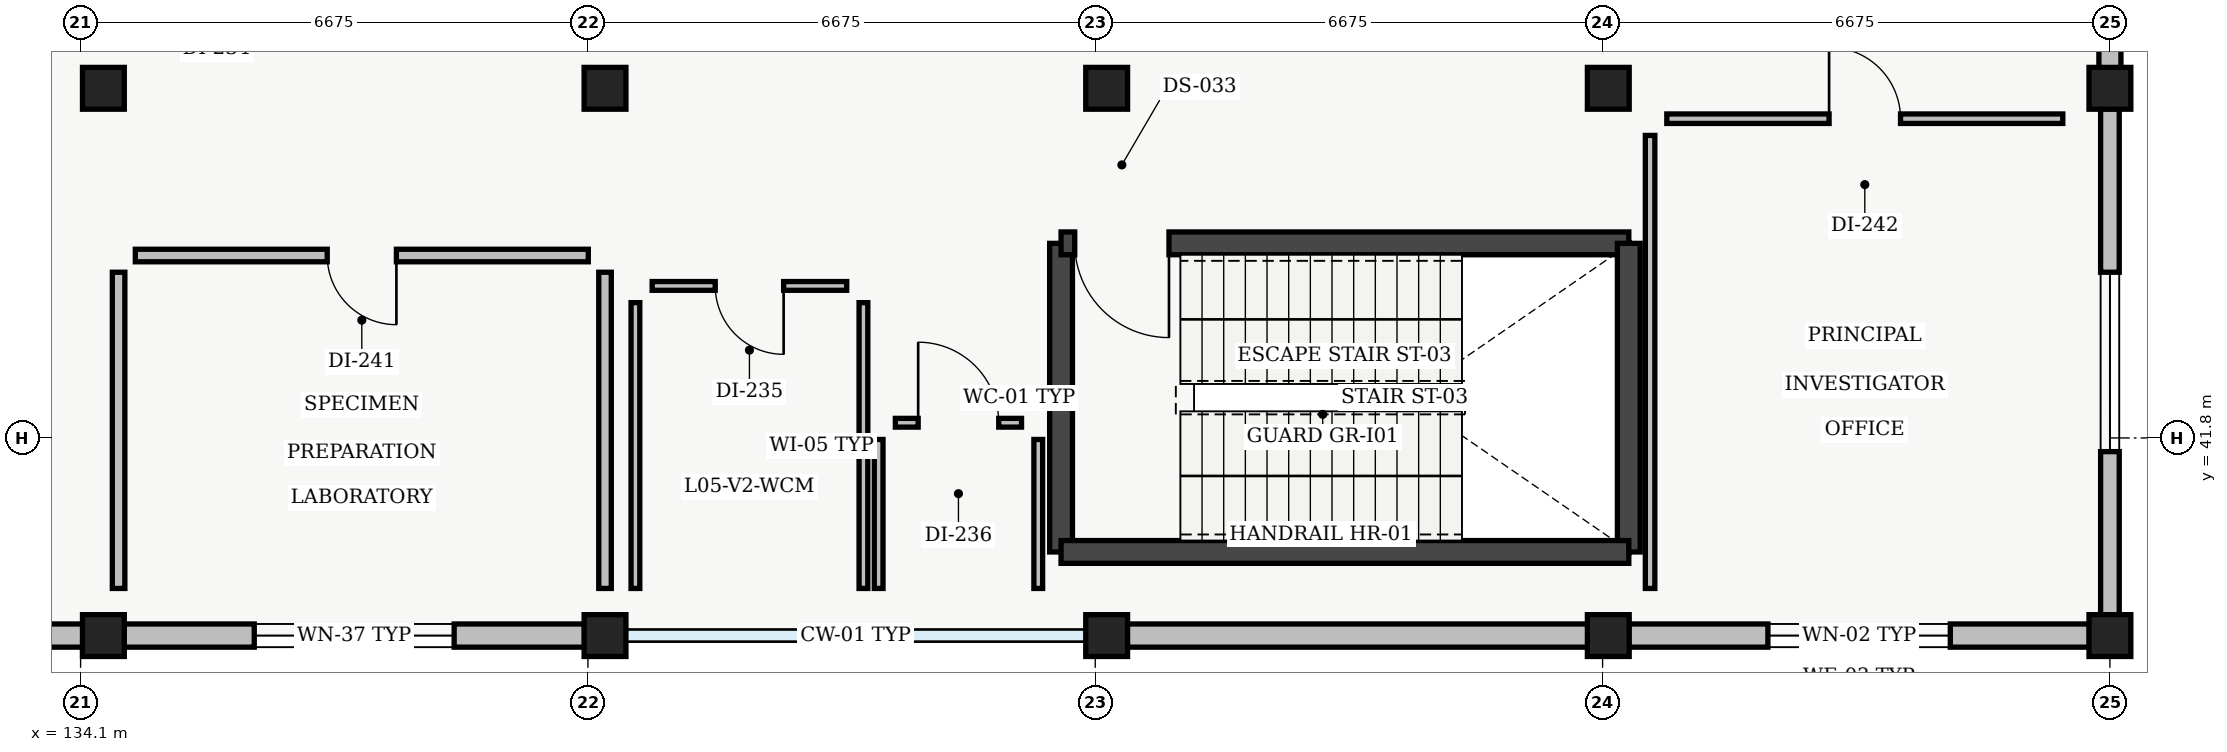
"""IFC4 building model, lengths in metres.
Left out: names, types, materials, properties, quantities, classifications, styles, units other than length and angle.
Written with IfcOpenShell. Run it as: python <this file> out.ifc"""

import sys

from ifc_helpers import new_model, si_unit, direction, frame, frame_2d, origin, origin_2d, place, context, subcontext, project, spatial, rectangle, extrude, element, fill, save


model = new_model("IFC4")
c1 = context("Model", 3, precision=1e-05, world=origin(), true_north=direction((0.0, 1.0)))
c2 = subcontext(c1, "Body", "Model", "MODEL_VIEW")
j1 = project(units=[si_unit("LENGTHUNIT", "METRE"), si_unit("PLANEANGLEUNIT", "RADIAN")], contexts=[c1])
p1 = place(None, origin())
s1 = spatial("IfcSite", under=j1, at=p1, CompositionType="ELEMENT")
p2 = place(p1, origin())
s2 = spatial("IfcBuilding", under=s1, at=p2, CompositionType="ELEMENT")
p3 = place(p2, frame((0.0, 0.0, 23.1)))
s3 = spatial("IfcBuildingStorey", under=s2, at=p3, CompositionType="ELEMENT", Elevation=23.1)
for number, where, z_axis, x_axis in (
    (1, (134.4, 39.2, 0.0), (0.0, 0.0, 1.0), (1.0, 0.0, 0.0)),
    (2, (134.4, 46.4, 0.0), (0.0, 0.0, 1.0), (1.0, 0.0, 0.0)),
    (3, (141.0, 39.2, 0.0), (0.0, 0.0, 1.0), (1.0, 0.0, 0.0)),
    (4, (141.0, 46.4, 0.0), (0.0, 0.0, 1.0), (1.0, 0.0, 0.0)),
    (5, (147.6, 39.2, 0.0), (0.0, 0.0, 1.0), (1.0, 0.0, 0.0)),
    (6, (147.6, 46.4, 0.0), (0.0, 0.0, 1.0), (1.0, 0.0, 0.0)),
    (7, (154.2, 39.2, 0.0), (0.0, 0.0, 1.0), (1.0, 0.0, 0.0)),
    (8, (154.2, 46.4, 0.0), (0.0, 0.0, 1.0), (1.0, 0.0, 0.0)),
    (9, (160.8, 39.2, 0.0), (0.0, 0.0, 1.0), (1.0, 0.0, 0.0)),
    (10, (160.8, 46.4, 0.0), (0.0, 0.0, 1.0), (1.0, 0.0, 0.0)),
):
    element("IfcColumn", number, at=place(p3, frame(where, z_axis=z_axis, x_axis=x_axis)), inside=s3, PredefinedType="COLUMN", context=c2, shape_type="SweptSolid", body=[
        extrude(rectangle(XDim=0.55, YDim=0.55, at=origin_2d()), origin(), (0.0, 0.0, 1.0), 4.29),
    ])
p4 = place(p3, frame((160.8, 53.33, 0.0), z_axis=(0.0, 0.0, 1.0), x_axis=(0.0, -1.0, 0.0)))
e11 = element("IfcWall", 11, at=p4, inside=s3, PredefinedType="STANDARD", context=c2, shape_type="SweptSolid", body=[
    extrude(rectangle(XDim=6.66, YDim=0.29, at=frame_2d((3.33, 0.0))), origin(), (0.0, 0.0, 1.0), 3.775),
])
p5 = place(p4, frame((2.105, 0.0, 0.95)))
e12 = element("IfcOpeningElement", 12, at=p5, cuts=e11, PredefinedType="OPENING", context=c2, shape_type="SweptSolid", body=[
    extrude(rectangle(XDim=2.45, YDim=1.38, at=frame_2d((1.225, 0.69))), frame((0.0, 0.145, 0.0), z_axis=(0.0, -1.0, 0.0), x_axis=(1.0, 0.0, 0.0)), (0.0, 0.0, 1.0), 0.29),
])
p6 = place(p3, frame((160.8, 46.13, 0.0), z_axis=(0.0, 0.0, 1.0), x_axis=(0.0, -1.0, 0.0)))
e13 = element("IfcWall", 13, at=p6, inside=s3, PredefinedType="STANDARD", context=c2, shape_type="SweptSolid", body=[
    extrude(rectangle(XDim=6.66, YDim=0.245, at=frame_2d((3.33, 0.0))), origin(), (0.0, 0.0, 1.0), 3.775),
])
p7 = place(p6, frame((2.15, 0.0, 0.95)))
e14 = element("IfcOpeningElement", 14, at=p7, cuts=e13, PredefinedType="OPENING", context=c2, shape_type="SweptSolid", body=[
    extrude(rectangle(XDim=2.36, YDim=1.36, at=frame_2d((1.18, 0.68))), frame((0.0, 0.123, 0.0), z_axis=(0.0, -1.0, 0.0), x_axis=(1.0, 0.0, 0.0)), (0.0, 0.0, 1.0), 0.245),
])
p8 = place(p3, frame((160.53, 39.2, 0.0), z_axis=(0.0, 0.0, 1.0), x_axis=(-1.0, 0.0, 0.0)))
e15 = element("IfcWall", 15, at=p8, inside=s3, PredefinedType="STANDARD", context=c2, shape_type="SweptSolid", body=[
    extrude(rectangle(XDim=6.06, YDim=0.305, at=frame_2d((3.03, 0.0))), origin(), (0.0, 0.0, 1.0), 3.775),
])
p9 = place(p8, frame((1.83, 0.0, 0.95)))
e16 = element("IfcOpeningElement", 16, at=p9, cuts=e15, PredefinedType="OPENING", context=c2, shape_type="SweptSolid", body=[
    extrude(rectangle(XDim=2.4, YDim=1.65, at=frame_2d((1.2, 0.825))), frame((0.0, 0.152, 0.0), z_axis=(0.0, -1.0, 0.0), x_axis=(1.0, 0.0, 0.0)), (0.0, 0.0, 1.0), 0.305),
])
p10 = place(p3, frame((153.93, 39.2, 0.0), z_axis=(0.0, 0.0, 1.0), x_axis=(-1.0, 0.0, 0.0)))
e17 = element("IfcWall", 17, at=p10, inside=s3, PredefinedType="STANDARD", context=c2, shape_type="SweptSolid", body=[
    extrude(rectangle(XDim=6.06, YDim=0.305, at=frame_2d((3.03, 0.0))), origin(), (0.0, 0.0, 1.0), 3.775),
])
p11 = place(p3, frame((140.73, 39.2, 0.0), z_axis=(0.0, 0.0, 1.0), x_axis=(-1.0, 0.0, 0.0)))
e18 = element("IfcWall", 18, at=p11, inside=s3, PredefinedType="STANDARD", context=c2, shape_type="SweptSolid", body=[
    extrude(rectangle(XDim=6.06, YDim=0.305, at=frame_2d((3.03, 0.0))), origin(), (0.0, 0.0, 1.0), 3.775),
])
p12 = place(p11, frame((1.715, 0.0, 0.95)))
e19 = element("IfcOpeningElement", 19, at=p12, cuts=e18, PredefinedType="OPENING", context=c2, shape_type="SweptSolid", body=[
    extrude(rectangle(XDim=2.63, YDim=1.42, at=frame_2d((1.315, 0.71))), frame((0.0, 0.152, 0.0), z_axis=(0.0, -1.0, 0.0), x_axis=(1.0, 0.0, 0.0)), (0.0, 0.0, 1.0), 0.305),
])
p13 = place(p3, frame((134.13, 39.2, 0.0), z_axis=(0.0, 0.0, 1.0), x_axis=(-1.0, 0.0, 0.0)))
e20 = element("IfcWall", 20, at=p13, inside=s3, PredefinedType="STANDARD", context=c2, shape_type="SweptSolid", body=[
    extrude(rectangle(XDim=6.06, YDim=0.305, at=frame_2d((3.03, 0.0))), origin(), (0.0, 0.0, 1.0), 3.775),
])
p14 = place(p13, frame((1.76, 0.0, 0.95)))
e21 = element("IfcOpeningElement", 21, at=p14, cuts=e20, PredefinedType="OPENING", context=c2, shape_type="SweptSolid", body=[
    extrude(rectangle(XDim=2.54, YDim=1.4, at=frame_2d((1.27, 0.7))), frame((0.0, 0.152, 0.0), z_axis=(0.0, -1.0, 0.0), x_axis=(1.0, 0.0, 0.0)), (0.0, 0.0, 1.0), 0.305),
])
p15 = place(p3, frame((147.0, 40.3, 0.0), z_axis=(0.0, 0.0, 1.0), x_axis=(0.0, 1.0, 0.0)))
e22 = element("IfcWall", 22, at=p15, inside=s3, PredefinedType="SHEAR", context=c2, shape_type="SweptSolid", body=[
    extrude(rectangle(XDim=4.06, YDim=0.3, at=frame_2d((2.03, 0.0))), origin(), (0.0, 0.0, 1.0), 4.28),
])
p16 = place(p3, frame((147.0, 44.36, 0.0), z_axis=(0.0, 0.0, 1.0), x_axis=(1.0, 0.0, 0.0)))
e23 = element("IfcWall", 23, at=p16, inside=s3, PredefinedType="SHEAR", context=c2, shape_type="SweptSolid", body=[
    extrude(rectangle(XDim=7.47, YDim=0.3, at=frame_2d((3.735, 0.0))), origin(), (0.0, 0.0, 1.0), 4.28),
])
p17 = place(p16, frame((0.18, 0.0, 0.0)))
e24 = element("IfcOpeningElement", 24, at=p17, cuts=e23, PredefinedType="OPENING", context=c2, shape_type="SweptSolid", body=[
    extrude(rectangle(XDim=1.24, YDim=2.15, at=frame_2d((0.62, 1.075))), frame((0.0, 0.15, 0.0), z_axis=(0.0, -1.0, 0.0), x_axis=(1.0, 0.0, 0.0)), (0.0, 0.0, 1.0), 0.3),
])
p18 = place(p3, frame((154.47, 44.36, 0.0), z_axis=(0.0, 0.0, 1.0), x_axis=(0.0, -1.0, 0.0)))
e25 = element("IfcWall", 25, at=p18, inside=s3, PredefinedType="SHEAR", context=c2, shape_type="SweptSolid", body=[
    extrude(rectangle(XDim=4.06, YDim=0.3, at=frame_2d((2.03, 0.0))), origin(), (0.0, 0.0, 1.0), 4.28),
])
p19 = place(p3, frame((154.47, 40.3, 0.0), z_axis=(0.0, 0.0, 1.0), x_axis=(-1.0, 0.0, 0.0)))
e26 = element("IfcWall", 26, at=p19, inside=s3, PredefinedType="SHEAR", context=c2, shape_type="SweptSolid", body=[
    extrude(rectangle(XDim=7.47, YDim=0.3, at=frame_2d((3.735, 0.0))), origin(), (0.0, 0.0, 1.0), 4.28),
])
p20 = place(p3, frame((144.4, 39.82, 0.0), z_axis=(0.0, 0.0, 1.0), x_axis=(0.0, 1.0, 0.0)))
e27 = element("IfcWall", 27, at=p20, inside=s3, PredefinedType="PARTITIONING", context=c2, shape_type="SweptSolid", body=[
    extrude(rectangle(XDim=3.76, YDim=0.115, at=frame_2d((1.88, 0.0))), origin(), (0.0, 0.0, 1.0), 3.95),
])
p21 = place(p3, frame((144.18, 43.8, 0.0), z_axis=(0.0, 0.0, 1.0), x_axis=(-1.0, 0.0, 0.0)))
e28 = element("IfcWall", 28, at=p21, inside=s3, PredefinedType="PARTITIONING", context=c2, shape_type="SweptSolid", body=[
    extrude(rectangle(XDim=2.56, YDim=0.115, at=frame_2d((1.28, 0.0))), origin(), (0.0, 0.0, 1.0), 3.95),
])
p22 = place(p21, frame((0.83, 0.0, 0.0)))
e29 = element("IfcOpeningElement", 29, at=p22, cuts=e28, PredefinedType="OPENING", context=c2, shape_type="SweptSolid", body=[
    extrude(rectangle(XDim=0.9, YDim=2.1, at=frame_2d((0.45, 1.05))), frame((0.0, 0.058, 0.0), z_axis=(0.0, -1.0, 0.0), x_axis=(1.0, 0.0, 0.0)), (0.0, 0.0, 1.0), 0.115),
])
p23 = place(p3, frame((141.4, 43.58, 0.0), z_axis=(0.0, 0.0, 1.0), x_axis=(0.0, -1.0, 0.0)))
e30 = element("IfcWall", 30, at=p23, inside=s3, PredefinedType="PARTITIONING", context=c2, shape_type="SweptSolid", body=[
    extrude(rectangle(XDim=3.76, YDim=0.115, at=frame_2d((1.88, 0.0))), origin(), (0.0, 0.0, 1.0), 3.95),
])
p24 = place(p3, frame((146.7, 39.82, 0.0), z_axis=(0.0, 0.0, 1.0), x_axis=(0.0, 1.0, 0.0)))
e31 = element("IfcWall", 31, at=p24, inside=s3, PredefinedType="PARTITIONING", context=c2, shape_type="SweptSolid", body=[
    extrude(rectangle(XDim=1.96, YDim=0.115, at=frame_2d((0.98, 0.0))), origin(), (0.0, 0.0, 1.0), 3.95),
])
p25 = place(p3, frame((146.48, 42.0, 0.0), z_axis=(0.0, 0.0, 1.0), x_axis=(-1.0, 0.0, 0.0)))
e32 = element("IfcWall", 32, at=p25, inside=s3, PredefinedType="PARTITIONING", context=c2, shape_type="SweptSolid", body=[
    extrude(rectangle(XDim=1.66, YDim=0.115, at=frame_2d((0.83, 0.0))), origin(), (0.0, 0.0, 1.0), 3.95),
])
p26 = place(p25, frame((0.3, 0.0, 0.0)))
e33 = element("IfcOpeningElement", 33, at=p26, cuts=e32, PredefinedType="OPENING", context=c2, shape_type="SweptSolid", body=[
    extrude(rectangle(XDim=1.06, YDim=2.12, at=frame_2d((0.53, 1.06))), frame((0.0, 0.058, 0.0), z_axis=(0.0, -1.0, 0.0), x_axis=(1.0, 0.0, 0.0)), (0.0, 0.0, 1.0), 0.115),
])
p27 = place(p3, frame((144.6, 41.78, 0.0), z_axis=(0.0, 0.0, 1.0), x_axis=(0.0, -1.0, 0.0)))
e34 = element("IfcWall", 34, at=p27, inside=s3, PredefinedType="PARTITIONING", context=c2, shape_type="SweptSolid", body=[
    extrude(rectangle(XDim=1.96, YDim=0.115, at=frame_2d((0.98, 0.0))), origin(), (0.0, 0.0, 1.0), 3.95),
])
p28 = place(p3, frame((141.0, 39.82, 0.0), z_axis=(0.0, 0.0, 1.0), x_axis=(0.0, 1.0, 0.0)))
e35 = element("IfcWall", 35, at=p28, inside=s3, PredefinedType="PARTITIONING", context=c2, shape_type="SweptSolid", body=[
    extrude(rectangle(XDim=4.16, YDim=0.165, at=frame_2d((2.08, 0.0))), origin(), (0.0, 0.0, 1.0), 3.675),
])
p29 = place(p3, frame((140.78, 44.2, 0.0), z_axis=(0.0, 0.0, 1.0), x_axis=(-1.0, 0.0, 0.0)))
e36 = element("IfcWall", 36, at=p29, inside=s3, PredefinedType="PARTITIONING", context=c2, shape_type="SweptSolid", body=[
    extrude(rectangle(XDim=5.96, YDim=0.165, at=frame_2d((2.98, 0.0))), origin(), (0.0, 0.0, 1.0), 3.825),
])
p30 = place(p29, frame((2.525, 0.0, 0.0)))
e37 = element("IfcOpeningElement", 37, at=p30, cuts=e36, PredefinedType="OPENING", context=c2, shape_type="SweptSolid", body=[
    extrude(rectangle(XDim=0.91, YDim=2.08, at=frame_2d((0.455, 1.04))), frame((0.0, 0.083, 0.0), z_axis=(0.0, -1.0, 0.0), x_axis=(1.0, 0.0, 0.0)), (0.0, 0.0, 1.0), 0.165),
])
p31 = place(p3, frame((134.6, 43.98, 0.0), z_axis=(0.0, 0.0, 1.0), x_axis=(0.0, -1.0, 0.0)))
e38 = element("IfcWall", 38, at=p31, inside=s3, PredefinedType="PARTITIONING", context=c2, shape_type="SweptSolid", body=[
    extrude(rectangle(XDim=4.16, YDim=0.165, at=frame_2d((2.08, 0.0))), origin(), (0.0, 0.0, 1.0), 3.675),
])
p32 = place(p3, frame((160.18, 46.0, 0.0), z_axis=(0.0, 0.0, 1.0), x_axis=(-1.0, 0.0, 0.0)))
e39 = element("IfcWall", 39, at=p32, inside=s3, PredefinedType="PARTITIONING", context=c2, shape_type="SweptSolid", body=[
    extrude(rectangle(XDim=5.21, YDim=0.125, at=frame_2d((2.605, 0.0))), origin(), (0.0, 0.0, 1.0), 3.95),
])
p33 = place(p32, frame((2.135, 0.0, 0.0)))
e40 = element("IfcOpeningElement", 40, at=p33, cuts=e39, PredefinedType="OPENING", context=c2, shape_type="SweptSolid", body=[
    extrude(rectangle(XDim=0.94, YDim=2.12, at=frame_2d((0.47, 1.06))), frame((0.0, 0.062, 0.0), z_axis=(0.0, -1.0, 0.0), x_axis=(1.0, 0.0, 0.0)), (0.0, 0.0, 1.0), 0.125),
])
p34 = place(p3, frame((154.75, 45.78, 0.0), z_axis=(0.0, 0.0, 1.0), x_axis=(0.0, -1.0, 0.0)))
e41 = element("IfcWall", 41, at=p34, inside=s3, PredefinedType="PARTITIONING", context=c2, shape_type="SweptSolid", body=[
    extrude(rectangle(XDim=5.96, YDim=0.125, at=frame_2d((2.98, 0.0))), origin(), (0.0, 0.0, 1.0), 3.95),
])
p35 = place(p7, origin())
e42 = element("IfcWindow", 42, at=p35, inside=s3, PartitioningType="SINGLE_PANEL", PredefinedType="WINDOW", context=c2, shape_type="SweptSolid", body=[
    extrude(rectangle(XDim=2.36, YDim=1.36, at=frame_2d((1.18, 0.68))), frame((0.0, 0.03, 0.0), z_axis=(0.0, -1.0, 0.0), x_axis=(1.0, 0.0, 0.0)), (0.0, 0.0, 1.0), 0.06),
])
fill(e14, e42)
p36 = place(p9, origin())
e43 = element("IfcWindow", 43, at=p36, inside=s3, PartitioningType="SINGLE_PANEL", PredefinedType="WINDOW", context=c2, shape_type="SweptSolid", body=[
    extrude(rectangle(XDim=2.4, YDim=1.65, at=frame_2d((1.2, 0.825))), frame((0.0, 0.03, 0.0), z_axis=(0.0, -1.0, 0.0), x_axis=(1.0, 0.0, 0.0)), (0.0, 0.0, 1.0), 0.06),
])
fill(e16, e43)
p37 = place(p12, origin())
e44 = element("IfcWindow", 44, at=p37, inside=s3, PartitioningType="SINGLE_PANEL", PredefinedType="WINDOW", context=c2, shape_type="SweptSolid", body=[
    extrude(rectangle(XDim=2.63, YDim=1.42, at=frame_2d((1.315, 0.71))), frame((0.0, 0.03, 0.0), z_axis=(0.0, -1.0, 0.0), x_axis=(1.0, 0.0, 0.0)), (0.0, 0.0, 1.0), 0.06),
])
fill(e19, e44)
p38 = place(p17, origin())
e45 = element("IfcDoor", 45, at=p38, inside=s3, OperationType="SINGLE_SWING_RIGHT", PredefinedType="DOOR", context=c2, shape_type="SweptSolid", body=[
    extrude(rectangle(XDim=1.24, YDim=2.15, at=frame_2d((0.62, 1.075))), frame((0.0, 0.025, 0.0), z_axis=(0.0, -1.0, 0.0), x_axis=(1.0, 0.0, 0.0)), (0.0, 0.0, 1.0), 0.05),
])
fill(e24, e45)
p39 = place(p22, origin())
e46 = element("IfcDoor", 46, at=p39, inside=s3, OperationType="SINGLE_SWING_LEFT", PredefinedType="DOOR", context=c2, shape_type="SweptSolid", body=[
    extrude(rectangle(XDim=0.9, YDim=2.1, at=frame_2d((0.45, 1.05))), frame((0.0, 0.025, 0.0), z_axis=(0.0, -1.0, 0.0), x_axis=(1.0, 0.0, 0.0)), (0.0, 0.0, 1.0), 0.05),
])
fill(e29, e46)
p40 = place(p26, origin())
e47 = element("IfcDoor", 47, at=p40, inside=s3, OperationType="SINGLE_SWING_RIGHT", PredefinedType="DOOR", context=c2, shape_type="SweptSolid", body=[
    extrude(rectangle(XDim=1.06, YDim=2.12, at=frame_2d((0.53, 1.06))), frame((0.0, 0.025, 0.0), z_axis=(0.0, -1.0, 0.0), x_axis=(1.0, 0.0, 0.0)), (0.0, 0.0, 1.0), 0.05),
])
fill(e33, e47)
p41 = place(p30, origin())
e48 = element("IfcDoor", 48, at=p41, inside=s3, OperationType="SINGLE_SWING_LEFT", PredefinedType="DOOR", context=c2, shape_type="SweptSolid", body=[
    extrude(rectangle(XDim=0.91, YDim=2.08, at=frame_2d((0.455, 1.04))), frame((0.0, 0.025, 0.0), z_axis=(0.0, -1.0, 0.0), x_axis=(1.0, 0.0, 0.0)), (0.0, 0.0, 1.0), 0.05),
])
fill(e37, e48)
p42 = place(p33, origin())
e49 = element("IfcDoor", 49, at=p42, inside=s3, OperationType="SINGLE_SWING_RIGHT", PredefinedType="DOOR", context=c2, shape_type="SweptSolid", body=[
    extrude(rectangle(XDim=0.94, YDim=2.12, at=frame_2d((0.47, 1.06))), frame((0.0, 0.025, 0.0), z_axis=(0.0, -1.0, 0.0), x_axis=(1.0, 0.0, 0.0)), (0.0, 0.0, 1.0), 0.05),
])
fill(e40, e49)
save(model, sys.argv[1])
